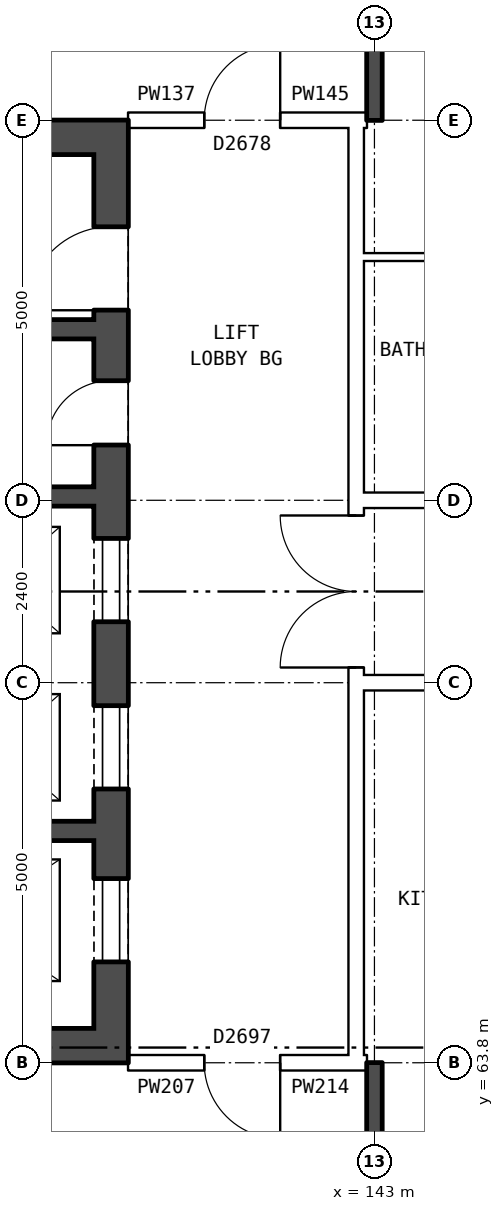
"""IFC4 building model, lengths in metres.
Left out: names, types, materials, properties, quantities, classifications, styles, units other than length and angle.
Written with IfcOpenShell. Run it as: python <this file> out.ifc"""

import sys

from ifc_helpers import new_model, si_unit, direction, frame, frame_2d, origin, place, context, subcontext, project, spatial, rectangle, extrude, element, fill, save


model = new_model("IFC4")
c1 = context("Model", 3, precision=1e-05, world=origin(), true_north=direction((0.0, 1.0)))
c2 = subcontext(c1, "Body", "Model", "MODEL_VIEW")
j1 = project(units=[si_unit("LENGTHUNIT", "METRE"), si_unit("PLANEANGLEUNIT", "RADIAN")], contexts=[c1])
p1 = place(None, origin())
s1 = spatial("IfcSite", under=j1, at=p1, CompositionType="ELEMENT")
p2 = place(p1, origin())
s2 = spatial("IfcBuilding", under=s1, at=p2, CompositionType="ELEMENT")
p3 = place(p2, frame((0.0, 0.0, 191.3)))
s3 = spatial("IfcBuildingStorey", under=s2, at=p3, CompositionType="ELEMENT", Elevation=191.3)
p4 = place(p3, frame((139.535, 63.8, 0.0), z_axis=(0.0, 0.0, 1.0), x_axis=(0.0, 1.0, 0.0)))
e1 = element("IfcWall", 1, at=p4, inside=s3, PredefinedType="SHEAR", context=c2, shape_type="SweptSolid", body=[
    extrude(rectangle(XDim=12.4, YDim=0.45, at=frame_2d((6.2, 0.0))), origin(), (0.0, 0.0, 1.0), 2.85),
])
p5 = place(p4, frame((1.325, 0.0, 0.0)))
e2 = element("IfcOpeningElement", 2, at=p5, cuts=e1, PredefinedType="OPENING", context=c2, shape_type="SweptSolid", body=[
    extrude(rectangle(XDim=1.1, YDim=2.1, at=frame_2d((0.55, 1.05))), frame((0.0, 0.235, 0.0), z_axis=(0.0, -1.0, 0.0), x_axis=(1.0, 0.0, 0.0)), (0.0, 0.0, 1.0), 0.47),
])
p6 = place(p4, frame((3.6, 0.0, 0.0)))
e3 = element("IfcOpeningElement", 3, at=p6, cuts=e1, PredefinedType="OPENING", context=c2, shape_type="SweptSolid", body=[
    extrude(rectangle(XDim=1.1, YDim=2.1, at=frame_2d((0.55, 1.05))), frame((0.0, 0.235, 0.0), z_axis=(0.0, -1.0, 0.0), x_axis=(1.0, 0.0, 0.0)), (0.0, 0.0, 1.0), 0.47),
])
p7 = place(p4, frame((5.8, 0.0, 0.0)))
e4 = element("IfcOpeningElement", 4, at=p7, cuts=e1, PredefinedType="OPENING", context=c2, shape_type="SweptSolid", body=[
    extrude(rectangle(XDim=1.1, YDim=2.1, at=frame_2d((0.55, 1.05))), frame((0.0, 0.235, 0.0), z_axis=(0.0, -1.0, 0.0), x_axis=(1.0, 0.0, 0.0)), (0.0, 0.0, 1.0), 0.47),
])
p8 = place(p4, frame((9.9, 0.0, 0.0)))
e5 = element("IfcOpeningElement", 5, at=p8, cuts=e1, PredefinedType="OPENING", context=c2, shape_type="SweptSolid", body=[
    extrude(rectangle(XDim=1.1, YDim=2.1, at=frame_2d((0.55, 1.05))), frame((0.0, 0.235, 0.0), z_axis=(0.0, -1.0, 0.0), x_axis=(1.0, 0.0, 0.0)), (0.0, 0.0, 1.0), 0.47),
])
p9 = place(p4, frame((8.125, 0.0, 0.0)))
e6 = element("IfcOpeningElement", 6, at=p9, cuts=e1, PredefinedType="OPENING", context=c2, shape_type="SweptSolid", body=[
    extrude(rectangle(XDim=0.85, YDim=2.1, at=frame_2d((0.425, 1.05))), frame((0.0, 0.235, 0.0), z_axis=(0.0, -1.0, 0.0), x_axis=(1.0, 0.0, 0.0)), (0.0, 0.0, 1.0), 0.47),
])
for number, where, z_axis, x_axis in (
    (7, (139.31, 64.025, 0.0), (0.0, 0.0, 1.0), (-1.0, 0.0, 0.0)),
    (8, (139.31, 75.975, 0.0), (0.0, 0.0, 1.0), (-1.0, 0.0, 0.0)),
):
    element("IfcWall", number, at=place(p3, frame(where, z_axis=z_axis, x_axis=x_axis)), inside=s3, PredefinedType="SHEAR", context=c2, shape_type="SweptSolid", body=[
        extrude(rectangle(XDim=7.5, YDim=0.45, at=frame_2d((3.75, 0.0))), origin(), (0.0, 0.0, 1.0), 2.85),
    ])
p10 = place(p3, frame((139.31, 66.85, 0.0), z_axis=(0.0, 0.0, 1.0), x_axis=(-1.0, 0.0, 0.0)))
e9 = element("IfcWall", 9, at=p10, inside=s3, PredefinedType="SHEAR", context=c2, shape_type="SweptSolid", body=[
    extrude(rectangle(XDim=4.675, YDim=0.25, at=frame_2d((2.337, 0.0))), origin(), (0.0, 0.0, 1.0), 2.85),
])
p11 = place(p3, frame((139.31, 71.25, 0.0), z_axis=(0.0, 0.0, 1.0), x_axis=(-1.0, 0.0, 0.0)))
e10 = element("IfcWall", 10, at=p11, inside=s3, PredefinedType="SHEAR", context=c2, shape_type="SweptSolid", body=[
    extrude(rectangle(XDim=7.5, YDim=0.25, at=frame_2d((3.75, 0.0))), origin(), (0.0, 0.0, 1.0), 2.85),
])
p12 = place(p11, frame((5.075, 0.0, 0.0)))
e11 = element("IfcOpeningElement", 11, at=p12, cuts=e10, PredefinedType="OPENING", context=c2, shape_type="SweptSolid", body=[
    extrude(rectangle(XDim=1.1, YDim=2.1, at=frame_2d((0.55, 1.05))), frame((0.0, 0.135, 0.0), z_axis=(0.0, -1.0, 0.0), x_axis=(1.0, 0.0, 0.0)), (0.0, 0.0, 1.0), 0.27),
])
p13 = place(p11, frame((3.275, 0.0, 0.0)))
e12 = element("IfcOpeningElement", 12, at=p13, cuts=e10, PredefinedType="OPENING", context=c2, shape_type="SweptSolid", body=[
    extrude(rectangle(XDim=0.85, YDim=2.1, at=frame_2d((0.425, 1.05))), frame((0.0, 0.135, 0.0), z_axis=(0.0, -1.0, 0.0), x_axis=(1.0, 0.0, 0.0)), (0.0, 0.0, 1.0), 0.27),
])
p14 = place(p3, frame((139.31, 73.45, 0.0), z_axis=(0.0, 0.0, 1.0), x_axis=(-1.0, 0.0, 0.0)))
e13 = element("IfcWall", 13, at=p14, inside=s3, PredefinedType="SHEAR", context=c2, shape_type="SweptSolid", body=[
    extrude(rectangle(XDim=2.475, YDim=0.25, at=frame_2d((1.238, 0.0))), origin(), (0.0, 0.0, 1.0), 2.85),
])
p15 = place(p3, frame((142.76, 63.9, 0.0), z_axis=(0.0, 0.0, 1.0), x_axis=(0.0, 1.0, 0.0)))
e14 = element("IfcWall", 14, at=p15, inside=s3, PredefinedType="PARTITIONING", context=c2, shape_type="SweptSolid", body=[
    extrude(rectangle(XDim=12.2, YDim=0.2, at=frame_2d((6.1, 0.0))), origin(), (0.0, 0.0, 1.0), 2.85),
])
p16 = place(p15, frame((5.1, 0.0, 0.0)))
e15 = element("IfcOpeningElement", 15, at=p16, cuts=e14, PredefinedType="OPENING", context=c2, shape_type="SweptSolid", body=[
    extrude(rectangle(XDim=2.0, YDim=2.1, at=frame_2d((1.0, 1.05))), frame((0.0, 0.11, 0.0), z_axis=(0.0, -1.0, 0.0), x_axis=(1.0, 0.0, 0.0)), (0.0, 0.0, 1.0), 0.22),
])
p17 = place(p3, frame((139.76, 63.8, 0.0), z_axis=(0.0, 0.0, 1.0), x_axis=(1.0, 0.0, 0.0)))
e16 = element("IfcWall", 16, at=p17, inside=s3, PredefinedType="PARTITIONING", context=c2, shape_type="SweptSolid", body=[
    extrude(rectangle(XDim=3.0, YDim=0.2, at=frame_2d((1.5, 0.0))), origin(), (0.0, 0.0, 1.0), 2.85),
])
p18 = place(p17, frame((1.0, 0.0, 0.0)))
e17 = element("IfcOpeningElement", 17, at=p18, cuts=e16, PredefinedType="OPENING", context=c2, shape_type="SweptSolid", body=[
    extrude(rectangle(XDim=1.0, YDim=2.1, at=frame_2d((0.5, 1.05))), frame((0.0, 0.11, 0.0), z_axis=(0.0, -1.0, 0.0), x_axis=(1.0, 0.0, 0.0)), (0.0, 0.0, 1.0), 0.22),
])
p19 = place(p3, frame((142.76, 63.8, 0.0), z_axis=(0.0, 0.0, 1.0), x_axis=(1.0, 0.0, 0.0)))
e18 = element("IfcWall", 18, at=p19, inside=s3, PredefinedType="PARTITIONING", context=c2, shape_type="SweptSolid", body=[
    extrude(rectangle(XDim=0.14, YDim=0.2, at=frame_2d((0.07, 0.0))), origin(), (0.0, 0.0, 1.0), 2.85),
])
p20 = place(p3, frame((142.76, 68.8, 0.0), z_axis=(0.0, 0.0, 1.0), x_axis=(1.0, 0.0, 0.0)))
e19 = element("IfcWall", 19, at=p20, inside=s3, PredefinedType="PARTITIONING", context=c2, shape_type="SweptSolid", body=[
    extrude(rectangle(XDim=14.48, YDim=0.2, at=frame_2d((7.24, 0.0))), origin(), (0.0, 0.0, 1.0), 2.85),
])
p21 = place(p20, frame((1.12, 0.0, 0.0)))
e20 = element("IfcOpeningElement", 20, at=p21, cuts=e19, PredefinedType="OPENING", context=c2, shape_type="SweptSolid", body=[
    extrude(rectangle(XDim=1.0, YDim=2.1, at=frame_2d((0.5, 1.05))), frame((0.0, 0.11, 0.0), z_axis=(0.0, -1.0, 0.0), x_axis=(1.0, 0.0, 0.0)), (0.0, 0.0, 1.0), 0.22),
])
p22 = place(p20, frame((7.24, 0.0, 0.0)))
e21 = element("IfcOpeningElement", 21, at=p22, cuts=e19, PredefinedType="OPENING", context=c2, shape_type="SweptSolid", body=[
    extrude(rectangle(XDim=1.0, YDim=2.1, at=frame_2d((0.5, 1.05))), frame((0.0, 0.11, 0.0), z_axis=(0.0, -1.0, 0.0), x_axis=(1.0, 0.0, 0.0)), (0.0, 0.0, 1.0), 0.22),
])
p23 = place(p3, frame((142.76, 71.2, 0.0), z_axis=(0.0, 0.0, 1.0), x_axis=(1.0, 0.0, 0.0)))
e22 = element("IfcWall", 22, at=p23, inside=s3, PredefinedType="PARTITIONING", context=c2, shape_type="SweptSolid", body=[
    extrude(rectangle(XDim=14.48, YDim=0.2, at=frame_2d((7.24, 0.0))), origin(), (0.0, 0.0, 1.0), 2.85),
])
p24 = place(p23, frame((4.24, 0.0, 0.0)))
e23 = element("IfcOpeningElement", 23, at=p24, cuts=e22, PredefinedType="OPENING", context=c2, shape_type="SweptSolid", body=[
    extrude(rectangle(XDim=1.0, YDim=2.1, at=frame_2d((0.5, 1.05))), frame((0.0, 0.11, 0.0), z_axis=(0.0, -1.0, 0.0), x_axis=(1.0, 0.0, 0.0)), (0.0, 0.0, 1.0), 0.22),
])
p25 = place(p23, frame((7.24, 0.0, 0.0)))
e24 = element("IfcOpeningElement", 24, at=p25, cuts=e22, PredefinedType="OPENING", context=c2, shape_type="SweptSolid", body=[
    extrude(rectangle(XDim=1.0, YDim=2.1, at=frame_2d((0.5, 1.05))), frame((0.0, 0.11, 0.0), z_axis=(0.0, -1.0, 0.0), x_axis=(1.0, 0.0, 0.0)), (0.0, 0.0, 1.0), 0.22),
])
p26 = place(p3, frame((142.76, 74.4, 0.0), z_axis=(0.0, 0.0, 1.0), x_axis=(1.0, 0.0, 0.0)))
e25 = element("IfcWall", 25, at=p26, inside=s3, PredefinedType="PARTITIONING", context=c2, shape_type="SweptSolid", body=[
    extrude(rectangle(XDim=3.24, YDim=0.1, at=frame_2d((1.62, 0.0))), origin(), (0.0, 0.0, 1.0), 2.85),
])
p27 = place(p3, frame((139.76, 76.2, 0.0), z_axis=(0.0, 0.0, 1.0), x_axis=(1.0, 0.0, 0.0)))
e26 = element("IfcWall", 26, at=p27, inside=s3, PredefinedType="PARTITIONING", context=c2, shape_type="SweptSolid", body=[
    extrude(rectangle(XDim=3.0, YDim=0.2, at=frame_2d((1.5, 0.0))), origin(), (0.0, 0.0, 1.0), 2.85),
])
p28 = place(p27, frame((1.0, 0.0, 0.0)))
e27 = element("IfcOpeningElement", 27, at=p28, cuts=e26, PredefinedType="OPENING", context=c2, shape_type="SweptSolid", body=[
    extrude(rectangle(XDim=1.0, YDim=2.1, at=frame_2d((0.5, 1.05))), frame((0.0, 0.11, 0.0), z_axis=(0.0, -1.0, 0.0), x_axis=(1.0, 0.0, 0.0)), (0.0, 0.0, 1.0), 0.22),
])
p29 = place(p3, frame((142.76, 76.2, 0.0), z_axis=(0.0, 0.0, 1.0), x_axis=(1.0, 0.0, 0.0)))
e28 = element("IfcWall", 28, at=p29, inside=s3, PredefinedType="PARTITIONING", context=c2, shape_type="SweptSolid", body=[
    extrude(rectangle(XDim=0.14, YDim=0.2, at=frame_2d((0.07, 0.0))), origin(), (0.0, 0.0, 1.0), 2.85),
])
for number, where, z_axis, x_axis in (
    (29, (143.0, 54.36, 0.0), (0.0, 0.0, 1.0), (0.0, 1.0, 0.0)),
    (30, (143.0, 76.2, 0.0), (0.0, 0.0, 1.0), (0.0, 1.0, 0.0)),
):
    element("IfcWall", number, at=place(p3, frame(where, z_axis=z_axis, x_axis=x_axis)), inside=s3, PredefinedType="SOLIDWALL", context=c2, shape_type="SweptSolid", body=[
        extrude(rectangle(XDim=9.44, YDim=0.2, at=frame_2d((4.72, 0.0))), origin(), (0.0, 0.0, 1.0), 2.85),
    ])
p30 = place(p5, origin())
e31 = element("IfcDoor", 31, at=p30, inside=s3, OperationType="DOUBLE_DOOR_SLIDING", PredefinedType="DOOR", context=c2, shape_type="SweptSolid", body=[
    extrude(rectangle(XDim=1.1, YDim=2.1, at=frame_2d((0.55, 1.05))), frame((0.0, 0.21, 0.0), z_axis=(0.0, -1.0, 0.0), x_axis=(1.0, 0.0, 0.0)), (0.0, 0.0, 1.0), 0.05),
])
fill(e2, e31)
p31 = place(p6, origin())
e32 = element("IfcDoor", 32, at=p31, inside=s3, OperationType="DOUBLE_DOOR_SLIDING", PredefinedType="DOOR", context=c2, shape_type="SweptSolid", body=[
    extrude(rectangle(XDim=1.1, YDim=2.1, at=frame_2d((0.55, 1.05))), frame((0.0, 0.21, 0.0), z_axis=(0.0, -1.0, 0.0), x_axis=(1.0, 0.0, 0.0)), (0.0, 0.0, 1.0), 0.05),
])
fill(e3, e32)
p32 = place(p7, origin())
e33 = element("IfcDoor", 33, at=p32, inside=s3, OperationType="DOUBLE_DOOR_SLIDING", PredefinedType="DOOR", context=c2, shape_type="SweptSolid", body=[
    extrude(rectangle(XDim=1.1, YDim=2.1, at=frame_2d((0.55, 1.05))), frame((0.0, 0.21, 0.0), z_axis=(0.0, -1.0, 0.0), x_axis=(1.0, 0.0, 0.0)), (0.0, 0.0, 1.0), 0.05),
])
fill(e4, e33)
p33 = place(p8, origin())
e34 = element("IfcDoor", 34, at=p33, inside=s3, OperationType="SINGLE_SWING_LEFT", PredefinedType="DOOR", context=c2, shape_type="SweptSolid", body=[
    extrude(rectangle(XDim=1.1, YDim=2.1, at=frame_2d((0.55, 1.05))), frame((0.0, 0.21, 0.0), z_axis=(0.0, -1.0, 0.0), x_axis=(1.0, 0.0, 0.0)), (0.0, 0.0, 1.0), 0.05),
])
fill(e5, e34)
p34 = place(p9, origin())
e35 = element("IfcDoor", 35, at=p34, inside=s3, OperationType="SINGLE_SWING_LEFT", PredefinedType="DOOR", context=c2, shape_type="SweptSolid", body=[
    extrude(rectangle(XDim=0.85, YDim=2.1, at=frame_2d((0.425, 1.05))), frame((0.0, 0.21, 0.0), z_axis=(0.0, -1.0, 0.0), x_axis=(1.0, 0.0, 0.0)), (0.0, 0.0, 1.0), 0.05),
])
fill(e6, e35)
p35 = place(p16, origin())
e36 = element("IfcDoor", 36, at=p35, inside=s3, OperationType="DOUBLE_DOOR_SINGLE_SWING", PredefinedType="DOOR", context=c2, shape_type="SweptSolid", body=[
    extrude(rectangle(XDim=2.0, YDim=2.1, at=frame_2d((1.0, 1.05))), frame((0.0, 0.025, 0.0), z_axis=(0.0, -1.0, 0.0), x_axis=(1.0, 0.0, 0.0)), (0.0, 0.0, 1.0), 0.05),
])
fill(e15, e36)
p36 = place(p18, frame((1.0, 0.0, 0.0), z_axis=(0.0, 0.0, 1.0), x_axis=(-1.0, 0.0, 0.0)))
e37 = element("IfcDoor", 37, at=p36, inside=s3, OperationType="SINGLE_SWING_LEFT", PredefinedType="DOOR", context=c2, shape_type="SweptSolid", body=[
    extrude(rectangle(XDim=1.0, YDim=2.1, at=frame_2d((0.5, 1.05))), frame((0.0, 0.025, 0.0), z_axis=(0.0, -1.0, 0.0), x_axis=(1.0, 0.0, 0.0)), (0.0, 0.0, 1.0), 0.05),
])
fill(e17, e37)
p37 = place(p28, origin())
e38 = element("IfcDoor", 38, at=p37, inside=s3, OperationType="SINGLE_SWING_RIGHT", PredefinedType="DOOR", context=c2, shape_type="SweptSolid", body=[
    extrude(rectangle(XDim=1.0, YDim=2.1, at=frame_2d((0.5, 1.05))), frame((0.0, 0.025, 0.0), z_axis=(0.0, -1.0, 0.0), x_axis=(1.0, 0.0, 0.0)), (0.0, 0.0, 1.0), 0.05),
])
fill(e27, e38)
save(model, sys.argv[1])
